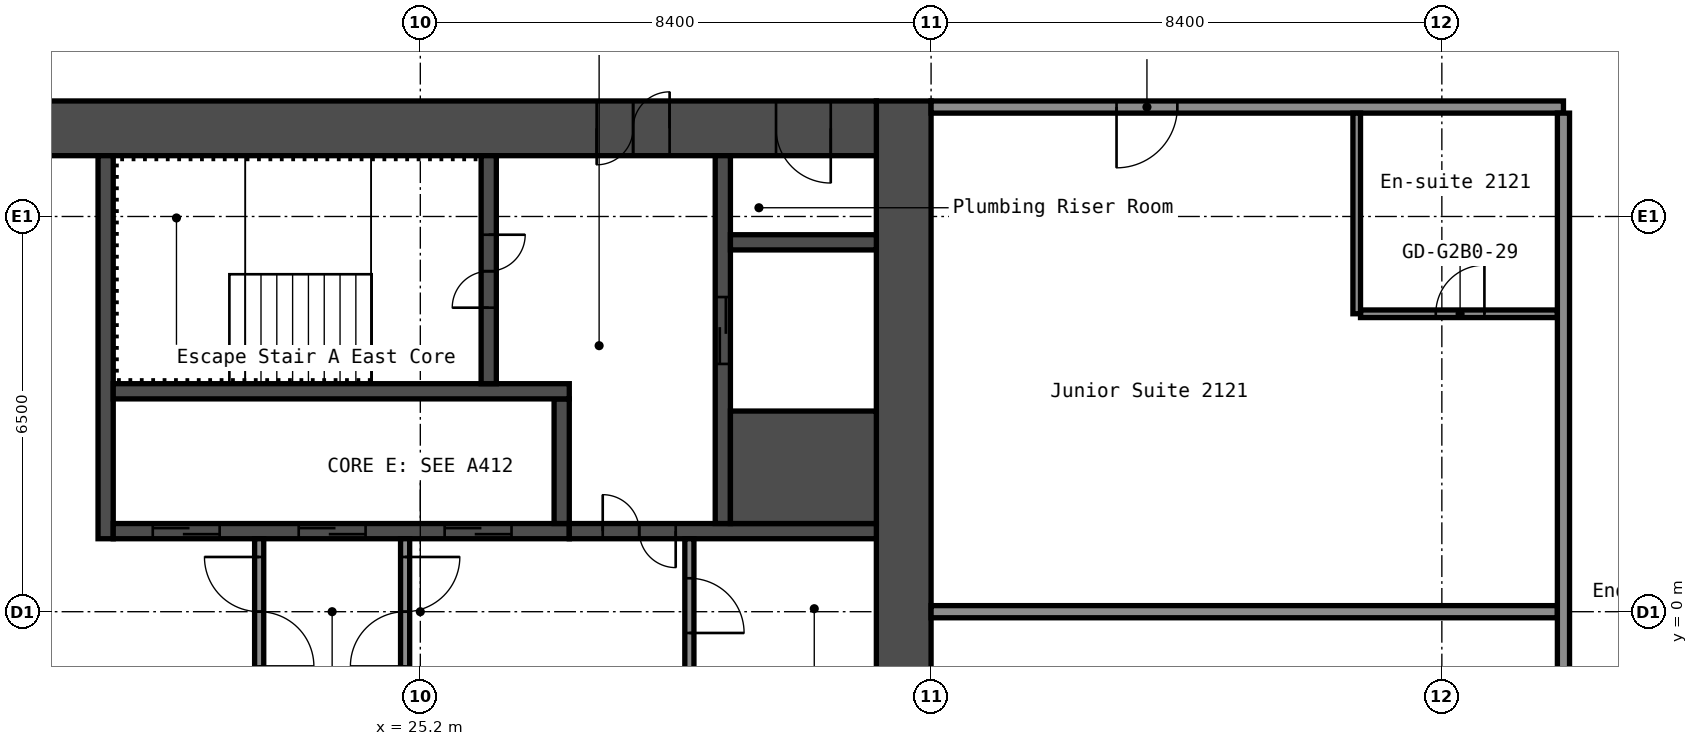
"""IFC4 building model, lengths in metres.
Left out: names, types, materials, properties, quantities, classifications, styles, units other than length and angle.
Written with IfcOpenShell. Run it as: python <this file> out.ifc"""

import sys

from ifc_helpers import new_model, si_unit, direction, frame, frame_2d, origin, place, context, subcontext, project, spatial, rectangle, extrude, element, fill, save


model = new_model("IFC4")
c1 = context("Model", 3, precision=1e-05, world=origin(), true_north=direction((0.0, 1.0)))
c2 = subcontext(c1, "Body", "Model", "MODEL_VIEW")
j1 = project(units=[si_unit("LENGTHUNIT", "METRE"), si_unit("PLANEANGLEUNIT", "RADIAN")], contexts=[c1])
p1 = place(None, origin())
s1 = spatial("IfcSite", under=j1, at=p1, CompositionType="ELEMENT")
p2 = place(p1, origin())
s2 = spatial("IfcBuilding", under=s1, at=p2, CompositionType="ELEMENT")
p3 = place(p2, frame((0.0, 0.0, 78.6)))
s3 = spatial("IfcBuildingStorey", under=s2, at=p3, CompositionType="ELEMENT", Elevation=78.6)
p4 = place(p3, frame((33.15, -8.4, 0.0), z_axis=(0.0, 0.0, 1.0), x_axis=(0.0, 1.0, 0.0)))
e1 = element("IfcWall", 1, at=p4, inside=s3, PredefinedType="SHEAR", context=c2, shape_type="SweptSolid", body=[
    extrude(rectangle(XDim=16.8, YDim=0.9, at=frame_2d((8.4, 0.0))), origin(), (0.0, 0.0, 1.0), 2.8),
])
p5 = place(p3, frame((17.7, 7.95, 0.0), z_axis=(0.0, 0.0, 1.0), x_axis=(1.0, 0.0, 0.0)))
e2 = element("IfcWall", 2, at=p5, inside=s3, PredefinedType="SHEAR", context=c2, shape_type="SweptSolid", body=[
    extrude(rectangle(XDim=15.0, YDim=0.9, at=frame_2d((7.5, 0.0))), origin(), (0.0, 0.0, 1.0), 2.8),
])
p6 = place(p5, frame((10.4, 0.0, 0.0)))
e3 = element("IfcOpeningElement", 3, at=p6, cuts=e2, PredefinedType="OPENING", context=c2, shape_type="SweptSolid", body=[
    extrude(rectangle(XDim=1.2, YDim=2.1, at=frame_2d((0.6, 1.05))), frame((0.0, 0.46, 0.0), z_axis=(0.0, -1.0, 0.0), x_axis=(1.0, 0.0, 0.0)), (0.0, 0.0, 1.0), 0.92),
])
p7 = place(p5, frame((13.35, 0.0, 0.0)))
e4 = element("IfcOpeningElement", 4, at=p7, cuts=e2, PredefinedType="OPENING", context=c2, shape_type="SweptSolid", body=[
    extrude(rectangle(XDim=0.9, YDim=2.1, at=frame_2d((0.45, 1.05))), frame((0.0, 0.46, 0.0), z_axis=(0.0, -1.0, 0.0), x_axis=(1.0, 0.0, 0.0)), (0.0, 0.0, 1.0), 0.92),
])
p8 = place(p3, frame((20.025, 1.2, 0.0), z_axis=(0.0, 0.0, 1.0), x_axis=(0.0, 1.0, 0.0)))
e5 = element("IfcWall", 5, at=p8, inside=s3, PredefinedType="SHEAR", context=c2, shape_type="SweptSolid", body=[
    extrude(rectangle(XDim=6.3, YDim=0.25, at=frame_2d((3.15, 0.0))), origin(), (0.0, 0.0, 1.0), 2.8),
])
p9 = place(p3, frame((20.15, 1.325, 0.0), z_axis=(0.0, 0.0, 1.0), x_axis=(1.0, 0.0, 0.0)))
e6 = element("IfcWall", 6, at=p9, inside=s3, PredefinedType="SHEAR", context=c2, shape_type="SweptSolid", body=[
    extrude(rectangle(XDim=7.5, YDim=0.25, at=frame_2d((3.75, 0.0))), origin(), (0.0, 0.0, 1.0), 2.8),
])
p10 = place(p9, frame((0.65, 0.0, 0.0)))
e7 = element("IfcOpeningElement", 7, at=p10, cuts=e6, PredefinedType="OPENING", context=c2, shape_type="SweptSolid", body=[
    extrude(rectangle(XDim=1.1, YDim=2.1, at=frame_2d((0.55, 1.05))), frame((0.0, 0.135, 0.0), z_axis=(0.0, -1.0, 0.0), x_axis=(1.0, 0.0, 0.0)), (0.0, 0.0, 1.0), 0.27),
])
p11 = place(p9, frame((3.05, 0.0, 0.0)))
e8 = element("IfcOpeningElement", 8, at=p11, cuts=e6, PredefinedType="OPENING", context=c2, shape_type="SweptSolid", body=[
    extrude(rectangle(XDim=1.1, YDim=2.1, at=frame_2d((0.55, 1.05))), frame((0.0, 0.135, 0.0), z_axis=(0.0, -1.0, 0.0), x_axis=(1.0, 0.0, 0.0)), (0.0, 0.0, 1.0), 0.27),
])
p12 = place(p9, frame((5.45, 0.0, 0.0)))
e9 = element("IfcOpeningElement", 9, at=p12, cuts=e6, PredefinedType="OPENING", context=c2, shape_type="SweptSolid", body=[
    extrude(rectangle(XDim=1.1, YDim=2.1, at=frame_2d((0.55, 1.05))), frame((0.0, 0.135, 0.0), z_axis=(0.0, -1.0, 0.0), x_axis=(1.0, 0.0, 0.0)), (0.0, 0.0, 1.0), 0.27),
])
p13 = place(p3, frame((27.525, 1.45, 0.0), z_axis=(0.0, 0.0, 1.0), x_axis=(0.0, 1.0, 0.0)))
e10 = element("IfcWall", 10, at=p13, inside=s3, PredefinedType="SHEAR", context=c2, shape_type="SweptSolid", body=[
    extrude(rectangle(XDim=2.05, YDim=0.25, at=frame_2d((1.025, 0.0))), origin(), (0.0, 0.0, 1.0), 2.8),
])
p14 = place(p3, frame((20.15, 3.625, 0.0), z_axis=(0.0, 0.0, 1.0), x_axis=(1.0, 0.0, 0.0)))
e11 = element("IfcWall", 11, at=p14, inside=s3, PredefinedType="SHEAR", context=c2, shape_type="SweptSolid", body=[
    extrude(rectangle(XDim=7.5, YDim=0.25, at=frame_2d((3.75, 0.0))), origin(), (0.0, 0.0, 1.0), 2.8),
])
p15 = place(p3, frame((26.325, 3.75, 0.0), z_axis=(0.0, 0.0, 1.0), x_axis=(0.0, 1.0, 0.0)))
e12 = element("IfcWall", 12, at=p15, inside=s3, PredefinedType="SHEAR", context=c2, shape_type="SweptSolid", body=[
    extrude(rectangle(XDim=3.75, YDim=0.25, at=frame_2d((1.875, 0.0))), origin(), (0.0, 0.0, 1.0), 2.8),
])
p16 = place(p15, frame((1.25, 0.0, 0.0)))
e13 = element("IfcOpeningElement", 13, at=p16, cuts=e12, PredefinedType="OPENING", context=c2, shape_type="SweptSolid", body=[
    extrude(rectangle(XDim=1.2, YDim=2.1, at=frame_2d((0.6, 1.05))), frame((0.0, 0.135, 0.0), z_axis=(0.0, -1.0, 0.0), x_axis=(1.0, 0.0, 0.0)), (0.0, 0.0, 1.0), 0.27),
])
p17 = place(p3, frame((27.65, 1.325, 0.0), z_axis=(0.0, 0.0, 1.0), x_axis=(1.0, 0.0, 0.0)))
e14 = element("IfcWall", 14, at=p17, inside=s3, PredefinedType="SHEAR", context=c2, shape_type="SweptSolid", body=[
    extrude(rectangle(XDim=5.05, YDim=0.25, at=frame_2d((2.525, 0.0))), origin(), (0.0, 0.0, 1.0), 2.8),
])
p18 = place(p17, frame((0.55, 0.0, 0.0)))
e15 = element("IfcOpeningElement", 15, at=p18, cuts=e14, PredefinedType="OPENING", context=c2, shape_type="SweptSolid", body=[
    extrude(rectangle(XDim=1.2, YDim=2.1, at=frame_2d((0.6, 1.05))), frame((0.0, 0.135, 0.0), z_axis=(0.0, -1.0, 0.0), x_axis=(1.0, 0.0, 0.0)), (0.0, 0.0, 1.0), 0.27),
])
p19 = place(p3, frame((30.175, 1.45, 0.0), z_axis=(0.0, 0.0, 1.0), x_axis=(0.0, 1.0, 0.0)))
e16 = element("IfcWall", 16, at=p19, inside=s3, PredefinedType="SHEAR", context=c2, shape_type="SweptSolid", body=[
    extrude(rectangle(XDim=6.05, YDim=0.25, at=frame_2d((3.025, 0.0))), origin(), (0.0, 0.0, 1.0), 2.8),
])
p20 = place(p19, frame((2.625, 0.0, 0.0)))
e17 = element("IfcOpeningElement", 17, at=p20, cuts=e16, PredefinedType="OPENING", context=c2, shape_type="SweptSolid", body=[
    extrude(rectangle(XDim=1.1, YDim=2.1, at=frame_2d((0.55, 1.05))), frame((0.0, 0.135, 0.0), z_axis=(0.0, -1.0, 0.0), x_axis=(1.0, 0.0, 0.0)), (0.0, 0.0, 1.0), 0.27),
])
p21 = place(p3, frame((30.3, 2.375, 0.0), z_axis=(0.0, 0.0, 1.0), x_axis=(1.0, 0.0, 0.0)))
e18 = element("IfcWall", 18, at=p21, inside=s3, PredefinedType="SHEAR", context=c2, shape_type="SweptSolid", body=[
    extrude(rectangle(XDim=2.4, YDim=1.85, at=frame_2d((1.2, 0.0))), origin(), (0.0, 0.0, 1.0), 2.8),
])
p22 = place(p3, frame((30.3, 6.075, 0.0), z_axis=(0.0, 0.0, 1.0), x_axis=(1.0, 0.0, 0.0)))
e19 = element("IfcWall", 19, at=p22, inside=s3, PredefinedType="SHEAR", context=c2, shape_type="SweptSolid", body=[
    extrude(rectangle(XDim=2.4, YDim=0.25, at=frame_2d((1.2, 0.0))), origin(), (0.0, 0.0, 1.0), 2.8),
])
p23 = place(p3, frame((22.55, -1.2, 0.0), z_axis=(0.0, 0.0, 1.0), x_axis=(0.0, 1.0, 0.0)))
e20 = element("IfcWall", 20, at=p23, inside=s3, PredefinedType="PARTITIONING", context=c2, shape_type="SweptSolid", body=[
    extrude(rectangle(XDim=2.4, YDim=0.15, at=frame_2d((1.2, 0.0))), origin(), (0.0, 0.0, 1.0), 2.8),
])
p24 = place(p23, frame((0.3, 0.0, 0.0)))
e21 = element("IfcOpeningElement", 21, at=p24, cuts=e20, PredefinedType="OPENING", context=c2, shape_type="SweptSolid", body=[
    extrude(rectangle(XDim=1.8, YDim=2.1, at=frame_2d((0.9, 1.05))), frame((0.0, 0.085, 0.0), z_axis=(0.0, -1.0, 0.0), x_axis=(1.0, 0.0, 0.0)), (0.0, 0.0, 1.0), 0.17),
])
p25 = place(p3, frame((24.95, -1.2, 0.0), z_axis=(0.0, 0.0, 1.0), x_axis=(0.0, 1.0, 0.0)))
e22 = element("IfcWall", 22, at=p25, inside=s3, PredefinedType="PARTITIONING", context=c2, shape_type="SweptSolid", body=[
    extrude(rectangle(XDim=2.4, YDim=0.15, at=frame_2d((1.2, 0.0))), origin(), (0.0, 0.0, 1.0), 2.8),
])
p26 = place(p25, frame((0.3, 0.0, 0.0)))
e23 = element("IfcOpeningElement", 23, at=p26, cuts=e22, PredefinedType="OPENING", context=c2, shape_type="SweptSolid", body=[
    extrude(rectangle(XDim=1.8, YDim=2.1, at=frame_2d((0.9, 1.05))), frame((0.0, 0.085, 0.0), z_axis=(0.0, -1.0, 0.0), x_axis=(1.0, 0.0, 0.0)), (0.0, 0.0, 1.0), 0.17),
])
p27 = place(p3, frame((29.625, -1.15, 0.0), z_axis=(0.0, 0.0, 1.0), x_axis=(0.0, 1.0, 0.0)))
e24 = element("IfcWall", 24, at=p27, inside=s3, PredefinedType="PARTITIONING", context=c2, shape_type="SweptSolid", body=[
    extrude(rectangle(XDim=2.35, YDim=0.15, at=frame_2d((1.175, 0.0))), origin(), (0.0, 0.0, 1.0), 2.8),
])
p28 = place(p27, frame((0.8, 0.0, 0.0)))
e25 = element("IfcOpeningElement", 25, at=p28, cuts=e24, PredefinedType="OPENING", context=c2, shape_type="SweptSolid", body=[
    extrude(rectangle(XDim=0.9, YDim=2.1, at=frame_2d((0.45, 1.05))), frame((0.0, 0.085, 0.0), z_axis=(0.0, -1.0, 0.0), x_axis=(1.0, 0.0, 0.0)), (0.0, 0.0, 1.0), 0.17),
])
p29 = place(p3, frame((33.6, 0.0, 0.0), z_axis=(0.0, 0.0, 1.0), x_axis=(1.0, 0.0, 0.0)))
e26 = element("IfcWall", 26, at=p29, inside=s3, PredefinedType="PARTITIONING", context=c2, shape_type="SweptSolid", body=[
    extrude(rectangle(XDim=10.3, YDim=0.2, at=frame_2d((5.15, 0.0))), origin(), (0.0, 0.0, 1.0), 2.8),
])
p30 = place(p3, frame((40.663, 4.9, 0.0), z_axis=(0.0, 0.0, 1.0), x_axis=(1.0, 0.0, 0.0)))
e27 = element("IfcWall", 27, at=p30, inside=s3, PredefinedType="PARTITIONING", context=c2, shape_type="SweptSolid", body=[
    extrude(rectangle(XDim=3.237, YDim=0.125, at=frame_2d((1.619, 0.0))), origin(), (0.0, 0.0, 1.0), 2.8),
])
p31 = place(p30, frame((1.238, 0.0, 0.0)))
e28 = element("IfcOpeningElement", 28, at=p31, cuts=e27, PredefinedType="OPENING", context=c2, shape_type="SweptSolid", body=[
    extrude(rectangle(XDim=0.8, YDim=2.1, at=frame_2d((0.4, 1.05))), frame((0.0, 0.073, 0.0), z_axis=(0.0, -1.0, 0.0), x_axis=(1.0, 0.0, 0.0)), (0.0, 0.0, 1.0), 0.145),
])
p32 = place(p3, frame((33.6, 8.3, 0.0), z_axis=(0.0, 0.0, 1.0), x_axis=(1.0, 0.0, 0.0)))
e29 = element("IfcWall", 29, at=p32, inside=s3, PredefinedType="PARTITIONING", context=c2, shape_type="SweptSolid", body=[
    extrude(rectangle(XDim=10.4, YDim=0.2, at=frame_2d((5.2, 0.0))), origin(), (0.0, 0.0, 1.0), 2.8),
])
p33 = place(p32, frame((3.05, 0.0, 0.0)))
e30 = element("IfcOpeningElement", 30, at=p33, cuts=e29, PredefinedType="OPENING", context=c2, shape_type="SweptSolid", body=[
    extrude(rectangle(XDim=1.0, YDim=2.1, at=frame_2d((0.5, 1.05))), frame((0.0, 0.11, 0.0), z_axis=(0.0, -1.0, 0.0), x_axis=(1.0, 0.0, 0.0)), (0.0, 0.0, 1.0), 0.22),
])
p34 = place(p3, frame((40.6, 4.9, 0.0), z_axis=(0.0, 0.0, 1.0), x_axis=(0.0, 1.0, 0.0)))
e31 = element("IfcWall", 31, at=p34, inside=s3, PredefinedType="PARTITIONING", context=c2, shape_type="SweptSolid", body=[
    extrude(rectangle(XDim=3.3, YDim=0.125, at=frame_2d((1.65, 0.0))), origin(), (0.0, 0.0, 1.0), 2.8),
])
p35 = place(p3, frame((44.0, -8.2, 0.0), z_axis=(0.0, 0.0, 1.0), x_axis=(0.0, 1.0, 0.0)))
e32 = element("IfcWall", 32, at=p35, inside=s3, PredefinedType="PARTITIONING", context=c2, shape_type="SweptSolid", body=[
    extrude(rectangle(XDim=16.4, YDim=0.2, at=frame_2d((8.2, 0.0))), origin(), (0.0, 0.0, 1.0), 2.8),
])
p36 = place(p6, origin())
e33 = element("IfcDoor", 33, at=p36, inside=s3, OperationType="DOUBLE_DOOR_SINGLE_SWING", PredefinedType="DOOR", context=c2, shape_type="SweptSolid", body=[
    extrude(rectangle(XDim=1.2, YDim=2.1, at=frame_2d((0.6, 1.05))), frame((0.0, 0.025, 0.0), z_axis=(0.0, -1.0, 0.0), x_axis=(1.0, 0.0, 0.0)), (0.0, 0.0, 1.0), 0.05),
])
fill(e3, e33)
p37 = place(p7, origin())
e34 = element("IfcDoor", 34, at=p37, inside=s3, OperationType="SINGLE_SWING_RIGHT", PredefinedType="DOOR", context=c2, shape_type="SweptSolid", body=[
    extrude(rectangle(XDim=0.9, YDim=2.1, at=frame_2d((0.45, 1.05))), frame((0.0, 0.025, 0.0), z_axis=(0.0, -1.0, 0.0), x_axis=(1.0, 0.0, 0.0)), (0.0, 0.0, 1.0), 0.05),
])
fill(e4, e34)
p38 = place(p16, origin())
e35 = element("IfcDoor", 35, at=p38, inside=s3, OperationType="DOUBLE_DOOR_SINGLE_SWING", PredefinedType="DOOR", context=c2, shape_type="SweptSolid", body=[
    extrude(rectangle(XDim=1.2, YDim=2.1, at=frame_2d((0.6, 1.05))), frame((0.0, 0.025, 0.0), z_axis=(0.0, -1.0, 0.0), x_axis=(1.0, 0.0, 0.0)), (0.0, 0.0, 1.0), 0.05),
])
fill(e13, e35)
p39 = place(p18, origin())
e36 = element("IfcDoor", 36, at=p39, inside=s3, OperationType="DOUBLE_DOOR_SINGLE_SWING", PredefinedType="DOOR", context=c2, shape_type="SweptSolid", body=[
    extrude(rectangle(XDim=1.2, YDim=2.1, at=frame_2d((0.6, 1.05))), frame((0.0, 0.025, 0.0), z_axis=(0.0, -1.0, 0.0), x_axis=(1.0, 0.0, 0.0)), (0.0, 0.0, 1.0), 0.05),
])
fill(e15, e36)
p40 = place(p24, origin())
e37 = element("IfcDoor", 37, at=p40, inside=s3, OperationType="DOUBLE_DOOR_SINGLE_SWING", PredefinedType="DOOR", context=c2, shape_type="SweptSolid", body=[
    extrude(rectangle(XDim=1.8, YDim=2.1, at=frame_2d((0.9, 1.05))), frame((0.0, 0.025, 0.0), z_axis=(0.0, -1.0, 0.0), x_axis=(1.0, 0.0, 0.0)), (0.0, 0.0, 1.0), 0.05),
])
fill(e21, e37)
p41 = place(p26, origin())
e38 = element("IfcDoor", 38, at=p41, inside=s3, OperationType="DOUBLE_DOOR_SINGLE_SWING", PredefinedType="DOOR", context=c2, shape_type="SweptSolid", body=[
    extrude(rectangle(XDim=1.8, YDim=2.1, at=frame_2d((0.9, 1.05))), frame((0.0, 0.025, 0.0), z_axis=(0.0, -1.0, 0.0), x_axis=(1.0, 0.0, 0.0)), (0.0, 0.0, 1.0), 0.05),
])
fill(e23, e38)
p42 = place(p28, origin())
e39 = element("IfcDoor", 39, at=p42, inside=s3, OperationType="SINGLE_SWING_LEFT", PredefinedType="DOOR", context=c2, shape_type="SweptSolid", body=[
    extrude(rectangle(XDim=0.9, YDim=2.1, at=frame_2d((0.45, 1.05))), frame((0.0, 0.025, 0.0), z_axis=(0.0, -1.0, 0.0), x_axis=(1.0, 0.0, 0.0)), (0.0, 0.0, 1.0), 0.05),
])
fill(e25, e39)
p43 = place(p10, origin())
e40 = element("IfcDoor", 40, at=p43, inside=s3, OperationType="DOUBLE_DOOR_SLIDING", PredefinedType="DOOR", context=c2, shape_type="SweptSolid", body=[
    extrude(rectangle(XDim=1.1, YDim=2.1, at=frame_2d((0.55, 1.05))), frame((0.0, 0.025, 0.0), z_axis=(0.0, -1.0, 0.0), x_axis=(1.0, 0.0, 0.0)), (0.0, 0.0, 1.0), 0.05),
])
fill(e7, e40)
p44 = place(p11, origin())
e41 = element("IfcDoor", 41, at=p44, inside=s3, OperationType="DOUBLE_DOOR_SLIDING", PredefinedType="DOOR", context=c2, shape_type="SweptSolid", body=[
    extrude(rectangle(XDim=1.1, YDim=2.1, at=frame_2d((0.55, 1.05))), frame((0.0, 0.025, 0.0), z_axis=(0.0, -1.0, 0.0), x_axis=(1.0, 0.0, 0.0)), (0.0, 0.0, 1.0), 0.05),
])
fill(e8, e41)
p45 = place(p12, origin())
e42 = element("IfcDoor", 42, at=p45, inside=s3, OperationType="DOUBLE_DOOR_SLIDING", PredefinedType="DOOR", context=c2, shape_type="SweptSolid", body=[
    extrude(rectangle(XDim=1.1, YDim=2.1, at=frame_2d((0.55, 1.05))), frame((0.0, 0.025, 0.0), z_axis=(0.0, -1.0, 0.0), x_axis=(1.0, 0.0, 0.0)), (0.0, 0.0, 1.0), 0.05),
])
fill(e9, e42)
p46 = place(p20, origin())
e43 = element("IfcDoor", 43, at=p46, inside=s3, OperationType="DOUBLE_DOOR_SLIDING", PredefinedType="DOOR", context=c2, shape_type="SweptSolid", body=[
    extrude(rectangle(XDim=1.1, YDim=2.1, at=frame_2d((0.55, 1.05))), frame((0.0, 0.025, 0.0), z_axis=(0.0, -1.0, 0.0), x_axis=(1.0, 0.0, 0.0)), (0.0, 0.0, 1.0), 0.05),
])
fill(e17, e43)
p47 = place(p31, origin())
e44 = element("IfcDoor", 44, at=p47, inside=s3, OperationType="SINGLE_SWING_LEFT", PredefinedType="DOOR", context=c2, shape_type="SweptSolid", body=[
    extrude(rectangle(XDim=0.8, YDim=2.1, at=frame_2d((0.4, 1.05))), frame((0.0, 0.025, 0.0), z_axis=(0.0, -1.0, 0.0), x_axis=(1.0, 0.0, 0.0)), (0.0, 0.0, 1.0), 0.05),
])
fill(e28, e44)
p48 = place(p33, origin())
e45 = element("IfcDoor", 45, at=p48, inside=s3, OperationType="SINGLE_SWING_LEFT", PredefinedType="DOOR", context=c2, shape_type="SweptSolid", body=[
    extrude(rectangle(XDim=1.0, YDim=2.1, at=frame_2d((0.5, 1.05))), frame((0.0, 0.025, 0.0), z_axis=(0.0, -1.0, 0.0), x_axis=(1.0, 0.0, 0.0)), (0.0, 0.0, 1.0), 0.05),
])
fill(e30, e45)
save(model, sys.argv[1])
